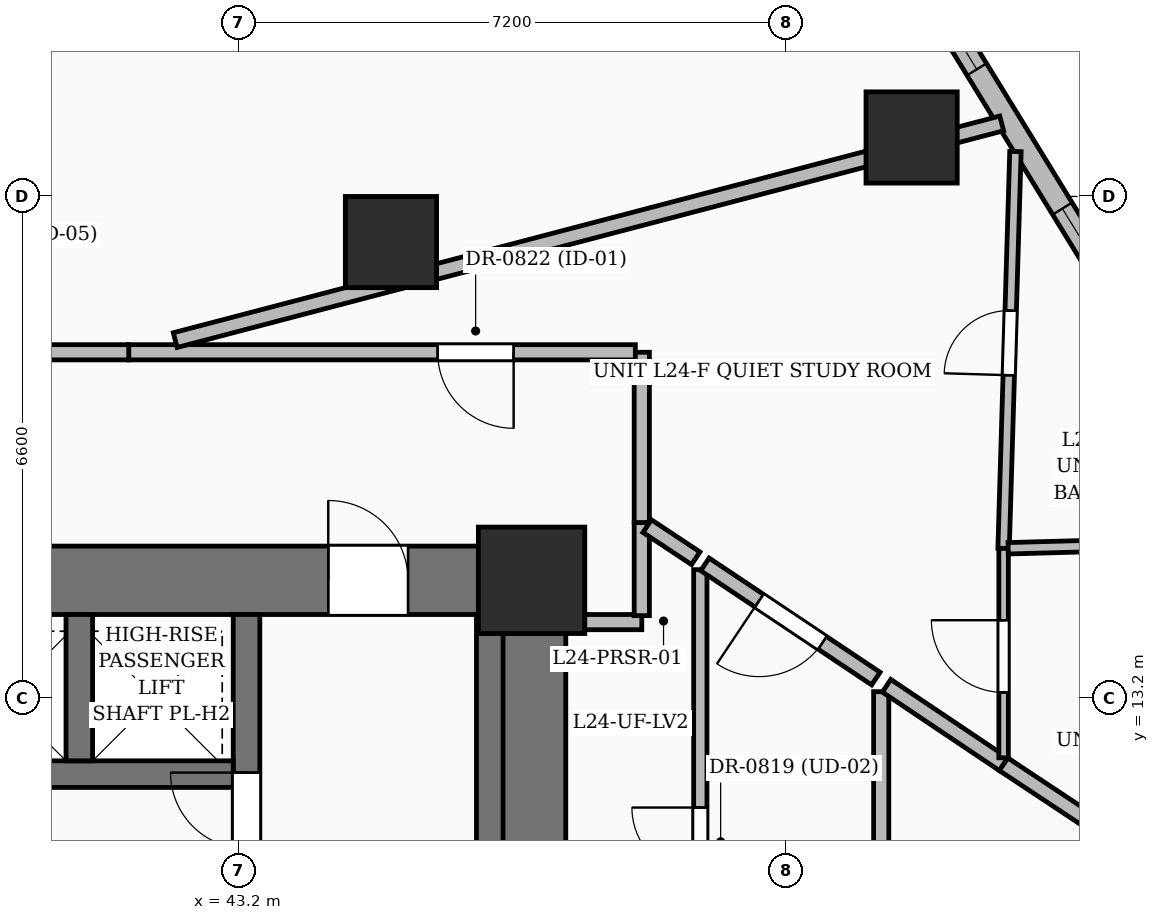
"""IFC4 building model, lengths in metres.
Left out: names, types, materials, properties, quantities, classifications, styles, units other than length and angle.
Written with IfcOpenShell. Run it as: python <this file> out.ifc"""

import sys

from ifc_helpers import new_model, si_unit, direction, frame, frame_2d, origin, origin_2d, place, context, subcontext, project, spatial, rectangle, extrude, element, fill, save


model = new_model("IFC4")
c1 = context("Model", 3, precision=1e-05, world=origin(), true_north=direction((0.0, 1.0)))
c2 = subcontext(c1, "Body", "Model", "MODEL_VIEW")
j1 = project(units=[si_unit("LENGTHUNIT", "METRE"), si_unit("PLANEANGLEUNIT", "RADIAN")], contexts=[c1])
p1 = place(None, origin())
s1 = spatial("IfcSite", under=j1, at=p1, CompositionType="ELEMENT")
p2 = place(p1, origin())
s2 = spatial("IfcBuilding", under=s1, at=p2, CompositionType="ELEMENT")
p3 = place(p2, frame((0.0, 0.0, 96.6)))
s3 = spatial("IfcBuildingStorey", under=s2, at=p3, CompositionType="ELEMENT", Elevation=96.6)
p4 = place(p3, frame((47.05, 14.75, 0.0), z_axis=(0.0, 0.0, 1.0), x_axis=(1.0, 0.0, 0.0)))
e1 = element("IfcColumn", 1, at=p4, inside=s3, PredefinedType="COLUMN", context=c2, shape_type="SweptSolid", body=[
    extrude(rectangle(XDim=1.4, YDim=1.4, at=origin_2d()), origin(), (0.0, 0.0, 1.0), 3.6),
])
p5 = place(p3, frame((45.2, 19.2, 0.0), z_axis=(0.0, 0.0, 1.0), x_axis=(1.0, 0.0, 0.0)))
e2 = element("IfcColumn", 2, at=p5, inside=s3, PredefinedType="COLUMN", context=c2, shape_type="SweptSolid", body=[
    extrude(rectangle(XDim=1.2, YDim=1.2, at=origin_2d()), origin(), (0.0, 0.0, 1.0), 3.6),
])
p6 = place(p3, frame((35.85, 14.75, 0.0), z_axis=(0.0, 0.0, 1.0), x_axis=(1.0, 0.0, 0.0)))
e3 = element("IfcWall", 3, at=p6, inside=s3, PredefinedType="SHEAR", context=c2, shape_type="SweptSolid", body=[
    extrude(rectangle(XDim=10.5, YDim=0.9, at=frame_2d((5.25, 0.0))), origin(), (0.0, 0.0, 1.0), 3.6),
])
p7 = place(p6, frame((0.925, 0.0, 0.0)))
e4 = element("IfcOpeningElement", 4, at=p7, cuts=e3, PredefinedType="OPENING", context=c2, shape_type="SweptSolid", body=[
    extrude(rectangle(XDim=1.05, YDim=2.15, at=frame_2d((0.525, 1.075))), frame((0.0, 0.46, 0.0), z_axis=(0.0, -1.0, 0.0), x_axis=(1.0, 0.0, 0.0)), (0.0, 0.0, 1.0), 0.92),
])
p8 = place(p6, frame((8.525, 0.0, 0.0)))
e5 = element("IfcOpeningElement", 5, at=p8, cuts=e3, PredefinedType="OPENING", context=c2, shape_type="SweptSolid", body=[
    extrude(rectangle(XDim=1.05, YDim=2.15, at=frame_2d((0.525, 1.075))), frame((0.0, 0.46, 0.0), z_axis=(0.0, -1.0, 0.0), x_axis=(1.0, 0.0, 0.0)), (0.0, 0.0, 1.0), 0.92),
])
p9 = place(p3, frame((47.05, 5.25, 0.0), z_axis=(0.0, 0.0, 1.0), x_axis=(0.0, 1.0, 0.0)))
e6 = element("IfcWall", 6, at=p9, inside=s3, PredefinedType="SHEAR", context=c2, shape_type="SweptSolid", body=[
    extrude(rectangle(XDim=8.8, YDim=0.9, at=frame_2d((4.4, 0.0))), origin(), (0.0, 0.0, 1.0), 3.6),
])
p10 = place(p3, frame((43.3, 5.2, 0.0), z_axis=(0.0, 0.0, 1.0), x_axis=(0.0, 1.0, 0.0)))
e7 = element("IfcWall", 7, at=p10, inside=s3, PredefinedType="SOLIDWALL", context=c2, shape_type="SweptSolid", body=[
    extrude(rectangle(XDim=9.1, YDim=0.35, at=frame_2d((4.55, 0.0))), origin(), (0.0, 0.0, 1.0), 3.6),
])
p11 = place(p10, frame((6.02, 0.0, 0.0)))
e8 = element("IfcOpeningElement", 8, at=p11, cuts=e7, PredefinedType="OPENING", context=c2, shape_type="SweptSolid", body=[
    extrude(rectangle(XDim=1.0, YDim=2.15, at=frame_2d((0.5, 1.075))), frame((0.0, 0.185, 0.0), z_axis=(0.0, -1.0, 0.0), x_axis=(1.0, 0.0, 0.0)), (0.0, 0.0, 1.0), 0.37),
])
p12 = place(p3, frame((46.5, 5.2, 0.0), z_axis=(0.0, 0.0, 1.0), x_axis=(0.0, 1.0, 0.0)))
e9 = element("IfcWall", 9, at=p12, inside=s3, PredefinedType="SOLIDWALL", context=c2, shape_type="SweptSolid", body=[
    extrude(rectangle(XDim=9.1, YDim=0.35, at=frame_2d((4.55, 0.0))), origin(), (0.0, 0.0, 1.0), 3.6),
])
p13 = place(p3, frame((39.075, 12.2, 0.0), z_axis=(0.0, 0.0, 1.0), x_axis=(1.0, 0.0, 0.0)))
e10 = element("IfcWall", 10, at=p13, inside=s3, PredefinedType="SOLIDWALL", context=c2, shape_type="SweptSolid", body=[
    extrude(rectangle(XDim=4.05, YDim=0.35, at=frame_2d((2.025, 0.0))), origin(), (0.0, 0.0, 1.0), 3.6),
])
p14 = place(p3, frame((41.1, 12.375, 0.0), z_axis=(0.0, 0.0, 1.0), x_axis=(0.0, 1.0, 0.0)))
e11 = element("IfcWall", 11, at=p14, inside=s3, PredefinedType="SOLIDWALL", context=c2, shape_type="SweptSolid", body=[
    extrude(rectangle(XDim=1.925, YDim=0.35, at=frame_2d((0.962, 0.0))), origin(), (0.0, 0.0, 1.0), 3.6),
])
p15 = place(p3, frame((52.05, 20.576, 0.0), z_axis=(0.0, 0.0, 1.0), x_axis=(1.0, 0.0, 0.0)))
e12 = element("IfcColumn", 12, at=p15, inside=s3, PredefinedType="COLUMN", context=c2, shape_type="SweptSolid", body=[
    extrude(rectangle(XDim=1.2, YDim=1.2, at=origin_2d()), origin(), (0.0, 0.0, 1.0), 3.6),
])
p16 = place(p3, frame((51.624, 23.559, 0.0), z_axis=(0.0, 0.0, 1.0), x_axis=(0.52370032897, -0.851902556303, 0.0)))
e13 = element("IfcWall", 13, at=p16, inside=s3, PredefinedType="SOLIDWALL", context=c2, shape_type="SweptSolid", body=[
    extrude(rectangle(XDim=6.827, YDim=0.3, at=frame_2d((3.414, 0.0))), origin(), (0.0, 0.0, 1.0), 3.3),
])
p17 = place(p16, frame((4.6, 0.0, 0.55)))
e14 = element("IfcOpeningElement", 14, at=p17, cuts=e13, PredefinedType="OPENING", context=c2, shape_type="SweptSolid", body=[
    extrude(rectangle(XDim=1.6, YDim=2.2, at=frame_2d((0.8, 1.1))), frame((0.0, 0.16, 0.0), z_axis=(0.0, -1.0, 0.0), x_axis=(1.0, 0.0, 0.0)), (0.0, 0.0, 1.0), 0.32),
])
p18 = place(p16, frame((0.85, 0.0, 0.55)))
e15 = element("IfcOpeningElement", 15, at=p18, cuts=e13, PredefinedType="OPENING", context=c2, shape_type="SweptSolid", body=[
    extrude(rectangle(XDim=1.6, YDim=2.2, at=frame_2d((0.8, 1.1))), frame((0.0, 0.16, 0.0), z_axis=(0.0, -1.0, 0.0), x_axis=(1.0, 0.0, 0.0)), (0.0, 0.0, 1.0), 0.32),
])
p19 = place(p3, frame((47.5, 14.2, 0.0), z_axis=(0.0, 0.0, 1.0), x_axis=(1.0, 0.0, 0.0)))
e16 = element("IfcWall", 16, at=p19, inside=s3, PredefinedType="PARTITIONING", context=c2, shape_type="SweptSolid", body=[
    extrude(rectangle(XDim=1.0, YDim=0.2, at=frame_2d((0.5, 0.0))), origin(), (0.0, 0.0, 1.0), 3.3),
])
p20 = place(p3, frame((48.5, 14.285, 0.0), z_axis=(0.0, 0.0, 1.0), x_axis=(0.0, 1.0, 0.0)))
e17 = element("IfcWall", 17, at=p20, inside=s3, PredefinedType="PARTITIONING", context=c2, shape_type="SweptSolid", body=[
    extrude(rectangle(XDim=1.225, YDim=0.2, at=frame_2d((0.613, 0.0))), origin(), (0.0, 0.0, 1.0), 3.3),
])
p21 = place(p3, frame((48.5, 15.51, 0.0), z_axis=(0.0, 0.0, 1.0), x_axis=(0.0, 1.0, 0.0)))
e18 = element("IfcWall", 18, at=p21, inside=s3, PredefinedType="PARTITIONING", context=c2, shape_type="SweptSolid", body=[
    extrude(rectangle(XDim=2.24, YDim=0.2, at=frame_2d((1.12, 0.0))), origin(), (0.0, 0.0, 1.0), 2.295),
])
p22 = place(p3, frame((48.415, 17.75, 0.0), z_axis=(0.0, 0.0, 1.0), x_axis=(-1.0, 0.0, 0.0)))
e19 = element("IfcWall", 19, at=p22, inside=s3, PredefinedType="PARTITIONING", context=c2, shape_type="SweptSolid", body=[
    extrude(rectangle(XDim=6.665, YDim=0.2, at=frame_2d((3.333, 0.0))), origin(), (0.0, 0.0, 1.0), 2.259),
])
p23 = place(p22, frame((1.601, 0.0, 0.0)))
e20 = element("IfcOpeningElement", 20, at=p23, cuts=e19, PredefinedType="OPENING", context=c2, shape_type="SweptSolid", body=[
    extrude(rectangle(XDim=1.0, YDim=2.2, at=frame_2d((0.5, 1.1))), frame((0.0, 0.11, 0.0), z_axis=(0.0, -1.0, 0.0), x_axis=(1.0, 0.0, 0.0)), (0.0, 0.0, 1.0), 0.22),
])
p24 = place(p3, frame((41.75, 17.75, 0.0), z_axis=(0.0, 0.0, 1.0), x_axis=(-1.0, 0.0, 0.0)))
e21 = element("IfcWall", 21, at=p24, inside=s3, PredefinedType="PARTITIONING", context=c2, shape_type="SweptSolid", body=[
    extrude(rectangle(XDim=4.52, YDim=0.2, at=frame_2d((2.26, 0.0))), origin(), (0.0, 0.0, 1.0), 3.3),
])
p25 = place(p24, frame((1.403, 0.0, 0.0)))
e22 = element("IfcOpeningElement", 22, at=p25, cuts=e21, PredefinedType="OPENING", context=c2, shape_type="SweptSolid", body=[
    extrude(rectangle(XDim=1.6, YDim=2.3, at=frame_2d((0.8, 1.15))), frame((0.0, 0.11, 0.0), z_axis=(0.0, -1.0, 0.0), x_axis=(1.0, 0.0, 0.0)), (0.0, 0.0, 1.0), 0.22),
])
p26 = place(p3, frame((49.27, 7.788, 0.0), z_axis=(0.0, 0.0, 1.0), x_axis=(0.0, 1.0, 0.0)))
e23 = element("IfcWall", 23, at=p26, inside=s3, PredefinedType="PARTITIONING", context=c2, shape_type="SweptSolid", body=[
    extrude(rectangle(XDim=7.102, YDim=0.175, at=frame_2d((3.551, 0.0))), origin(), (0.0, 0.0, 1.0), 2.81),
])
p27 = place(p26, frame((3.073, 0.0, 0.0)))
e24 = element("IfcOpeningElement", 24, at=p27, cuts=e23, PredefinedType="OPENING", context=c2, shape_type="SweptSolid", body=[
    extrude(rectangle(XDim=0.9, YDim=2.15, at=frame_2d((0.45, 1.075))), frame((0.0, 0.097, 0.0), z_axis=(0.0, -1.0, 0.0), x_axis=(1.0, 0.0, 0.0)), (0.0, 0.0, 1.0), 0.195),
])
p28 = place(p3, frame((49.21, 15.04, 0.0), z_axis=(0.0, 0.0, 1.0), x_axis=(-0.833761824074, 0.552124280137, 0.0)))
e25 = element("IfcWall", 25, at=p28, inside=s3, PredefinedType="PARTITIONING", context=c2, shape_type="SweptSolid", body=[
    extrude(rectangle(XDim=0.766, YDim=0.2, at=frame_2d((0.383, 0.0))), origin(), (0.0, 0.0, 1.0), 2.81),
])
p29 = place(p3, frame((51.65, 7.8, 0.0), z_axis=(0.0, 0.0, 1.0), x_axis=(0.0, 1.0, 0.0)))
e26 = element("IfcWall", 26, at=p29, inside=s3, PredefinedType="PARTITIONING", context=c2, shape_type="SweptSolid", body=[
    extrude(rectangle(XDim=5.485, YDim=0.2, at=frame_2d((2.742, 0.0))), origin(), (0.0, 0.0, 1.0), 2.295),
])
p30 = place(p29, frame((2.216, 0.0, 0.0)))
e27 = element("IfcOpeningElement", 27, at=p30, cuts=e26, PredefinedType="OPENING", context=c2, shape_type="SweptSolid", body=[
    extrude(rectangle(XDim=1.0, YDim=2.2, at=frame_2d((0.5, 1.1))), frame((0.0, 0.11, 0.0), z_axis=(0.0, -1.0, 0.0), x_axis=(1.0, 0.0, 0.0)), (0.0, 0.0, 1.0), 0.22),
])
p31 = place(p3, frame((51.579, 13.457, 0.0), z_axis=(0.0, 0.0, 1.0), x_axis=(-0.831522214089, 0.555491500814, 0.0)))
e28 = element("IfcWall", 28, at=p31, inside=s3, PredefinedType="PARTITIONING", context=c2, shape_type="SweptSolid", body=[
    extrude(rectangle(XDim=2.705, YDim=0.2, at=frame_2d((1.352, 0.0))), origin(), (0.0, 0.0, 1.0), 2.81),
])
p32 = place(p31, frame((0.846, 0.0, 0.0)))
e29 = element("IfcOpeningElement", 29, at=p32, cuts=e28, PredefinedType="OPENING", context=c2, shape_type="SweptSolid", body=[
    extrude(rectangle(XDim=1.0, YDim=2.2, at=frame_2d((0.5, 1.1))), frame((0.0, 0.11, 0.0), z_axis=(0.0, -1.0, 0.0), x_axis=(1.0, 0.0, 0.0)), (0.0, 0.0, 1.0), 0.22),
])
p33 = place(p3, frame((53.26, 12.33, 0.0), z_axis=(0.0, 0.0, 1.0), x_axis=(-0.830486641952, 0.557038542239, 0.0)))
e30 = element("IfcWall", 30, at=p33, inside=s3, PredefinedType="PARTITIONING", context=c2, shape_type="SweptSolid", body=[
    extrude(rectangle(XDim=1.854, YDim=0.2, at=frame_2d((0.927, 0.0))), origin(), (0.0, 0.0, 1.0), 2.81),
])
p34 = place(p3, frame((54.92, 11.23, 0.0), z_axis=(0.0, 0.0, 1.0), x_axis=(-0.833556136646, 0.552434762719, 0.0)))
e31 = element("IfcWall", 31, at=p34, inside=s3, PredefinedType="PARTITIONING", context=c2, shape_type="SweptSolid", body=[
    extrude(rectangle(XDim=1.991, YDim=0.2, at=frame_2d((0.996, 0.0))), origin(), (0.0, 0.0, 1.0), 2.295),
])
p35 = place(p3, frame((53.26, 15.17, 0.0), z_axis=(0.0, 0.0, 1.0), x_axis=(0.029866031463, 0.999553910584, 0.0)))
e32 = element("IfcWall", 32, at=p35, inside=s3, PredefinedType="PARTITIONING", context=c2, shape_type="SweptSolid", body=[
    extrude(rectangle(XDim=5.224, YDim=0.15, at=frame_2d((2.612, 0.0))), origin(), (0.0, 0.0, 1.0), 2.32),
])
p36 = place(p35, frame((2.279, 0.0, 0.0)))
e33 = element("IfcOpeningElement", 33, at=p36, cuts=e32, PredefinedType="OPENING", context=c2, shape_type="SweptSolid", body=[
    extrude(rectangle(XDim=0.85, YDim=2.1, at=frame_2d((0.425, 1.05))), frame((0.0, 0.085, 0.0), z_axis=(0.0, -1.0, 0.0), x_axis=(1.0, 0.0, 0.0)), (0.0, 0.0, 1.0), 0.17),
])
p37 = place(p3, frame((53.26, 12.415, 0.0), z_axis=(0.0, 0.0, 1.0), x_axis=(0.0, 1.0, 0.0)))
e34 = element("IfcWall", 34, at=p37, inside=s3, PredefinedType="PARTITIONING", context=c2, shape_type="SweptSolid", body=[
    extrude(rectangle(XDim=2.755, YDim=0.125, at=frame_2d((1.377, 0.0))), origin(), (0.0, 0.0, 1.0), 3.3),
])
p38 = place(p37, frame((0.86, 0.0, 0.0)))
e35 = element("IfcOpeningElement", 35, at=p38, cuts=e34, PredefinedType="OPENING", context=c2, shape_type="SweptSolid", body=[
    extrude(rectangle(XDim=0.95, YDim=2.2, at=frame_2d((0.475, 1.1))), frame((0.0, 0.072, 0.0), z_axis=(0.0, -1.0, 0.0), x_axis=(1.0, 0.0, 0.0)), (0.0, 0.0, 1.0), 0.145),
])
p39 = place(p3, frame((53.235, 20.761, 0.0), z_axis=(0.0, 0.0, 1.0), x_axis=(-0.967298670581, -0.253640063657, 0.0)))
e36 = element("IfcWall", 36, at=p39, inside=s3, PredefinedType="PARTITIONING", context=c2, shape_type="SweptSolid", body=[
    extrude(rectangle(XDim=11.241, YDim=0.2, at=frame_2d((5.62, 0.0))), origin(), (0.0, 0.0, 1.0), 2.259),
])
p40 = place(p3, frame((53.32, 15.171, 0.0), z_axis=(0.0, 0.0, 1.0), x_axis=(0.999624598181, 0.02739822461, 0.0)))
e37 = element("IfcWall", 37, at=p40, inside=s3, PredefinedType="PARTITIONING", context=c2, shape_type="SweptSolid", body=[
    extrude(rectangle(XDim=3.27, YDim=0.15, at=frame_2d((1.635, 0.0))), origin(), (0.0, 0.0, 1.0), 2.32),
])
p41 = place(p3, frame((33.402, 17.829, 0.0), z_axis=(0.0, 0.0, 1.0), x_axis=(0.377767569575, 0.925900460837, 0.0)))
e38 = element("IfcWall", 38, at=p41, inside=s3, PredefinedType="PARTITIONING", context=c2, shape_type="SweptSolid", body=[
    extrude(rectangle(XDim=21.516, YDim=0.175, at=frame_2d((10.758, 0.0))), origin(), (0.0, 0.0, 1.0), 2.259),
])
p42 = place(p3, frame((45.384, 29.606, 0.0), z_axis=(0.0, 0.0, 1.0), x_axis=(-0.566667167999, -0.823946794831, 0.0)))
e39 = element("IfcWall", 39, at=p42, inside=s3, PredefinedType="PARTITIONING", context=c2, shape_type="SweptSolid", body=[
    extrude(rectangle(XDim=14.304, YDim=0.1, at=frame_2d((7.152, 0.0))), origin(), (0.0, 0.0, 1.0), 2.81),
])
p43 = place(p17, origin())
e40 = element("IfcWindow", 40, at=p43, inside=s3, PartitioningType="SINGLE_PANEL", PredefinedType="WINDOW", context=c2, shape_type="SweptSolid", body=[
    extrude(rectangle(XDim=1.6, YDim=2.2, at=frame_2d((0.8, 1.1))), frame((0.0, 0.03, 0.0), z_axis=(0.0, -1.0, 0.0), x_axis=(1.0, 0.0, 0.0)), (0.0, 0.0, 1.0), 0.06),
])
fill(e14, e40)
p44 = place(p18, origin())
e41 = element("IfcWindow", 41, at=p44, inside=s3, PartitioningType="SINGLE_PANEL", PredefinedType="WINDOW", context=c2, shape_type="SweptSolid", body=[
    extrude(rectangle(XDim=1.6, YDim=2.2, at=frame_2d((0.8, 1.1))), frame((0.0, 0.03, 0.0), z_axis=(0.0, -1.0, 0.0), x_axis=(1.0, 0.0, 0.0)), (0.0, 0.0, 1.0), 0.06),
])
fill(e15, e41)
p45 = place(p8, origin())
e42 = element("IfcDoor", 42, at=p45, inside=s3, OperationType="SINGLE_SWING_LEFT", PredefinedType="DOOR", context=c2, shape_type="SweptSolid", body=[
    extrude(rectangle(XDim=1.05, YDim=2.15, at=frame_2d((0.525, 1.075))), frame((0.0, 0.025, 0.0), z_axis=(0.0, -1.0, 0.0), x_axis=(1.0, 0.0, 0.0)), (0.0, 0.0, 1.0), 0.05),
])
fill(e5, e42)
p46 = place(p11, origin())
e43 = element("IfcDoor", 43, at=p46, inside=s3, OperationType="SINGLE_SWING_RIGHT", PredefinedType="DOOR", context=c2, shape_type="SweptSolid", body=[
    extrude(rectangle(XDim=1.0, YDim=2.15, at=frame_2d((0.5, 1.075))), frame((0.0, 0.025, 0.0), z_axis=(0.0, -1.0, 0.0), x_axis=(1.0, 0.0, 0.0)), (0.0, 0.0, 1.0), 0.05),
])
fill(e8, e43)
p47 = place(p27, origin())
e44 = element("IfcDoor", 44, at=p47, inside=s3, OperationType="SINGLE_SWING_RIGHT", PredefinedType="DOOR", context=c2, shape_type="SweptSolid", body=[
    extrude(rectangle(XDim=0.9, YDim=2.15, at=frame_2d((0.45, 1.075))), frame((0.0, 0.025, 0.0), z_axis=(0.0, -1.0, 0.0), x_axis=(1.0, 0.0, 0.0)), (0.0, 0.0, 1.0), 0.05),
])
fill(e24, e44)
p48 = place(p23, origin())
e45 = element("IfcDoor", 45, at=p48, inside=s3, OperationType="SINGLE_SWING_LEFT", PredefinedType="DOOR", context=c2, shape_type="SweptSolid", body=[
    extrude(rectangle(XDim=1.0, YDim=2.2, at=frame_2d((0.5, 1.1))), frame((0.0, 0.025, 0.0), z_axis=(0.0, -1.0, 0.0), x_axis=(1.0, 0.0, 0.0)), (0.0, 0.0, 1.0), 0.05),
])
fill(e20, e45)
p49 = place(p38, origin())
e46 = element("IfcDoor", 46, at=p49, inside=s3, OperationType="SINGLE_SWING_RIGHT", PredefinedType="DOOR", context=c2, shape_type="SweptSolid", body=[
    extrude(rectangle(XDim=0.95, YDim=2.2, at=frame_2d((0.475, 1.1))), frame((0.0, 0.025, 0.0), z_axis=(0.0, -1.0, 0.0), x_axis=(1.0, 0.0, 0.0)), (0.0, 0.0, 1.0), 0.05),
])
fill(e35, e46)
p50 = place(p36, origin())
e47 = element("IfcDoor", 47, at=p50, inside=s3, OperationType="SINGLE_SWING_LEFT", PredefinedType="DOOR", context=c2, shape_type="SweptSolid", body=[
    extrude(rectangle(XDim=0.85, YDim=2.1, at=frame_2d((0.425, 1.05))), frame((0.0, 0.025, 0.0), z_axis=(0.0, -1.0, 0.0), x_axis=(1.0, 0.0, 0.0)), (0.0, 0.0, 1.0), 0.05),
])
fill(e33, e47)
p51 = place(p32, origin())
e48 = element("IfcDoor", 48, at=p51, inside=s3, OperationType="SINGLE_SWING_RIGHT", PredefinedType="DOOR", context=c2, shape_type="SweptSolid", body=[
    extrude(rectangle(XDim=1.0, YDim=2.2, at=frame_2d((0.5, 1.1))), frame((0.0, 0.025, 0.0), z_axis=(0.0, -1.0, 0.0), x_axis=(1.0, 0.0, 0.0)), (0.0, 0.0, 1.0), 0.05),
])
fill(e29, e48)
save(model, sys.argv[1])
